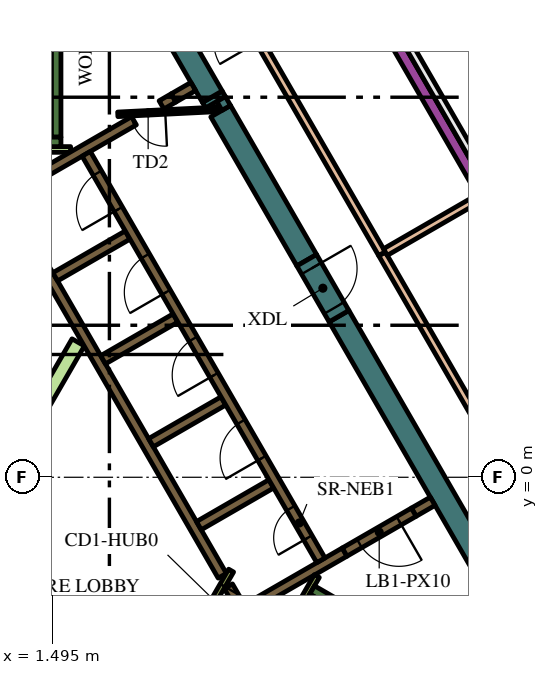
"""IFC4 building model, lengths in metres.
Left out: names, types, materials, properties, quantities, classifications, styles, units other than length and angle.
Written with IfcOpenShell. Run it as: python <this file> out.ifc"""

import sys

from ifc_helpers import new_model, si_unit, direction, frame, frame_2d, origin, place, context, subcontext, project, spatial, polyline, rectangle, outline, extrude, element, fill, save


model = new_model("IFC4")
c1 = context("Model", 3, precision=1e-05, world=origin(), true_north=direction((0.0, 1.0)))
c2 = subcontext(c1, "Body", "Model", "MODEL_VIEW")
j1 = project(units=[si_unit("LENGTHUNIT", "METRE"), si_unit("PLANEANGLEUNIT", "RADIAN")], contexts=[c1])
p1 = place(None, origin())
s1 = spatial("IfcSite", under=j1, at=p1, CompositionType="ELEMENT")
p2 = place(p1, origin())
s2 = spatial("IfcBuilding", under=s1, at=p2, CompositionType="ELEMENT")
p3 = place(p2, frame((0.0, 0.0, 336.0)))
s3 = spatial("IfcBuildingStorey", under=s2, at=p3, CompositionType="ELEMENT", Elevation=336.0)
p4 = place(p3, frame((9.042, 4.239, 0.0), z_axis=(0.0, 0.0, 1.0), x_axis=(0.500005785455, -0.866022063525, 0.0)))
e1 = element("IfcWall", 1, at=p4, inside=s3, PredefinedType="SOLIDWALL", context=c2, shape_type="SweptSolid", body=[
    extrude(rectangle(XDim=12.406, YDim=0.6, at=frame_2d((6.203, 0.0))), origin(), (0.0, 0.0, 1.0), 4.2),
])
p5 = place(p3, frame((5.709, 10.012, 0.0), z_axis=(0.0, 0.0, 1.0), x_axis=(0.500399834964, -0.865794435861, 0.0)))
e2 = element("IfcWall", 2, at=p5, inside=s3, PredefinedType="SOLIDWALL", context=c2, shape_type="SweptSolid", body=[
    extrude(rectangle(XDim=0.166, YDim=0.6, at=frame_2d((0.083, 0.0))), origin(), (0.0, 0.0, 1.0), 4.2),
])
p6 = place(p3, frame((5.928, 9.633, 0.0), z_axis=(0.0, 0.0, 1.0), x_axis=(0.499983823482, -0.8660347431, 0.0)))
e3 = element("IfcWall", 3, at=p6, inside=s3, PredefinedType="SOLIDWALL", context=c2, shape_type="SweptSolid", body=[
    extrude(rectangle(XDim=4.528, YDim=0.6, at=frame_2d((2.264, 0.0))), origin(), (0.0, 0.0, 1.0), 4.2),
])
p7 = place(p3, origin())
e4 = element("IfcWall", 4, at=p7, inside=s3, PredefinedType="SOLIDWALL", context=c2, shape_type="SweptSolid", body=[
    extrude(outline(polyline([(6.053, 10.016), (6.187, 9.784), (5.961, 9.654), (5.827, 9.886), (6.053, 10.016)])), origin(), (0.0, 0.0, 1.0), 4.2),
])
p8 = place(p3, frame((1.989, 16.456, 0.0), z_axis=(0.0, 0.0, 1.0), x_axis=(0.499990476767, -0.866030901956, 0.0)))
e5 = element("IfcWall", 5, at=p8, inside=s3, PredefinedType="SOLIDWALL", context=c2, shape_type="SweptSolid", body=[
    extrude(rectangle(XDim=7.438, YDim=0.6, at=frame_2d((3.719, 0.0))), origin(), (0.0, 0.0, 1.0), 4.2),
])
p9 = place(p3, frame((8.334, -2.964, 0.0), z_axis=(0.0, 0.0, 1.0), x_axis=(0.866016039709, -0.500016218704, 0.0)))
e6 = element("IfcWall", 6, at=p9, inside=s3, PredefinedType="SOLIDWALL", context=c2, shape_type="SweptSolid", body=[
    extrude(rectangle(XDim=7.05, YDim=0.25, at=frame_2d((3.525, 0.0))), origin(), (0.0, 0.0, 1.0), 4.2),
])
p10 = place(p3, frame((8.168, -3.503, 0.0), z_axis=(0.0, 0.0, 1.0), x_axis=(0.49972245349, 0.866185586049, 0.0)))
e7 = element("IfcWall", 7, at=p10, inside=s3, PredefinedType="SOLIDWALL", context=c2, shape_type="SweptSolid", body=[
    extrude(rectangle(XDim=0.425, YDim=0.25, at=frame_2d((0.212, 0.0))), origin(), (0.0, 0.0, 1.0), 4.2),
])
p11 = place(p3, frame((1.6, 8.95, 0.0), z_axis=(0.0, 0.0, 1.0), x_axis=(0.0, 1.0, 0.0)))
e8 = element("IfcWall", 8, at=p11, inside=s3, PredefinedType="SOLIDWALL", context=c2, shape_type="SweptSolid", body=[
    extrude(rectangle(XDim=6.8, YDim=0.25, at=frame_2d((3.4, 0.0))), origin(), (0.0, 0.0, 1.0), 4.2),
])
p12 = place(p3, frame((1.05, 8.825, 0.0), z_axis=(0.0, 0.0, 1.0), x_axis=(1.0, 0.0, 0.0)))
e9 = element("IfcWall", 9, at=p12, inside=s3, PredefinedType="SOLIDWALL", context=c2, shape_type="SweptSolid", body=[
    extrude(rectangle(XDim=0.675, YDim=0.25, at=frame_2d((0.337, 0.0))), origin(), (0.0, 0.0, 1.0), 4.2),
])
p13 = place(p3, frame((9.19, -1.969, 0.0), z_axis=(0.0, 0.0, 1.0), x_axis=(-0.866057109641, -0.499945079824, 0.0)))
e10 = element("IfcWall", 10, at=p13, inside=s3, PredefinedType="SOLIDWALL", context=c2, shape_type="SweptSolid", body=[
    extrude(rectangle(XDim=3.291, YDim=0.25, at=frame_2d((1.646, 0.0))), origin(), (0.0, 0.0, 1.0), 4.2),
])
p14 = place(p3, frame((6.13, -2.867, 0.0), z_axis=(0.0, 0.0, 1.0), x_axis=(0.500160776593, -0.865932559475, 0.0)))
e11 = element("IfcWall", 11, at=p14, inside=s3, PredefinedType="SOLIDWALL", context=c2, shape_type="SweptSolid", body=[
    extrude(rectangle(XDim=0.627, YDim=0.25, at=frame_2d((0.313, 0.0))), origin(), (0.0, 0.0, 1.0), 4.2),
])
p15 = place(p3, frame((11.507, -0.631, 0.0), z_axis=(0.0, 0.0, 1.0), x_axis=(-0.866093731455, -0.499881634324, 0.0)))
e12 = element("IfcWall", 12, at=p15, inside=s3, PredefinedType="SOLIDWALL", context=c2, shape_type="SweptSolid", body=[
    extrude(rectangle(XDim=0.575, YDim=0.25, at=frame_2d((0.288, 0.0))), origin(), (0.0, 0.0, 1.0), 4.2),
])
p16 = place(p3, frame((3.647, 9.38, 0.0), z_axis=(0.0, 0.0, 1.0), x_axis=(-0.866027868628, -0.499995730742, 0.0)))
e13 = element("IfcWall", 13, at=p16, inside=s3, PredefinedType="SOLIDWALL", context=c2, shape_type="SweptSolid", body=[
    extrude(rectangle(XDim=4.099, YDim=0.25, at=frame_2d((2.049, 0.0))), origin(), (0.0, 0.0, 1.0), 4.2),
])
p17 = place(p3, frame((5.97, -2.591, 0.0), z_axis=(0.0, 0.0, 1.0), x_axis=(-0.499994469932, 0.866028596547, 0.0)))
e14 = element("IfcWall", 14, at=p17, inside=s3, PredefinedType="SOLIDWALL", context=c2, shape_type="SweptSolid", body=[
    extrude(rectangle(XDim=10.488, YDim=0.25, at=frame_2d((5.244, 0.0))), origin(), (0.0, 0.0, 1.0), 4.2),
])
p18 = place(p3, frame((1.574, 5.274, 0.0), z_axis=(0.0, 0.0, 1.0), x_axis=(0.866028486751, 0.499994660107, 0.0)))
e15 = element("IfcWall", 15, at=p18, inside=s3, PredefinedType="SOLIDWALL", context=c2, shape_type="SweptSolid", body=[
    extrude(rectangle(XDim=2.2, YDim=0.25, at=frame_2d((1.1, 0.0))), origin(), (0.0, 0.0, 1.0), 4.2),
])
for number, where, z_axis, x_axis in (
    (16, (2.834, 3.091, 0.0), (0.0, 0.0, 1.0), (0.866, 0.5, 0.0)),
    (17, (4.094, 0.909, 0.0), (0.0, 0.0, 1.0), (0.866, 0.5, 0.0)),
    (18, (5.354, -1.274, 0.0), (0.0, 0.0, 1.0), (0.866, 0.5, 0.0)),
):
    element("IfcWall", number, at=place(p3, frame(where, z_axis=z_axis, x_axis=x_axis)), inside=s3, PredefinedType="SOLIDWALL", context=c2, shape_type="SweptSolid", body=[
        extrude(rectangle(XDim=2.2, YDim=0.25, at=frame_2d((1.1, 0.0))), origin(), (0.0, 0.0, 1.0), 4.2),
    ])
p19 = place(p3, frame((4.688, 9.981, 0.0), z_axis=(0.0, 0.0, 1.0), x_axis=(-0.865974312977, -0.500088481434, 0.0)))
e19 = element("IfcWall", 19, at=p19, inside=s3, PredefinedType="SOLIDWALL", context=c2, shape_type="SweptSolid", body=[
    extrude(rectangle(XDim=0.366, YDim=0.25, at=frame_2d((0.183, 0.0))), origin(), (0.0, 0.0, 1.0), 4.2),
])
p20 = place(p3, frame((4.689, 9.982, 0.0), z_axis=(0.0, 0.0, 1.0), x_axis=(0.865947592822, 0.500134748329, 0.0)))
e20 = element("IfcWall", 20, at=p20, inside=s3, PredefinedType="SOLIDWALL", context=c2, shape_type="SweptSolid", body=[
    extrude(rectangle(XDim=0.598, YDim=0.25, at=frame_2d((0.299, 0.0))), origin(), (0.0, 0.0, 1.0), 4.2),
])
p21 = place(p3, frame((1.05, 8.625, 0.0), z_axis=(0.0, 0.0, 1.0), x_axis=(1.0, 0.0, 0.0)))
e21 = element("IfcWall", 21, at=p21, inside=s3, PredefinedType="PARTITIONING", context=c2, shape_type="SweptSolid", body=[
    extrude(rectangle(XDim=0.929, YDim=0.15, at=frame_2d((0.464, 0.0))), origin(), (0.0, 0.0, 1.0), 3.45),
])
p22 = place(p3, frame((8.459, -2.599, 0.0), z_axis=(0.0, 0.0, 1.0), x_axis=(-0.500041054325, -0.866001699761, 0.0)))
e22 = element("IfcWall", 22, at=p22, inside=s3, PredefinedType="PARTITIONING", context=c2, shape_type="SweptSolid", body=[
    extrude(rectangle(XDim=0.929, YDim=0.15, at=frame_2d((0.464, 0.0))), origin(), (0.0, 0.0, 1.0), 4.2),
])
e23 = element("IfcWall", 23, at=p7, inside=s3, PredefinedType="PARTITIONING", context=c2, shape_type="SweptSolid", body=[
    extrude(outline(polyline([(2.017, 3.643), (2.342, 3.456), (-1.822, -3.756), (-2.147, -3.568), (2.017, 3.643)])), origin(), (0.0, 0.0, 1.0), 3.45),
])
p23 = place(p3, frame((8.565, -2.185, 0.0), z_axis=(0.0, 0.0, 1.0), x_axis=(-0.499997954832, 0.866026584559, 0.0)))
e24 = element("IfcWall", 24, at=p23, inside=s3, PredefinedType="SOLIDWALL", context=c2, shape_type="SweptSolid", body=[
    extrude(rectangle(XDim=12.35, YDim=0.25, at=frame_2d((6.175, 0.0))), origin(), (0.0, 0.0, 1.0), 4.2),
])
p24 = place(p23, frame((0.685, 0.0, 0.0)))
e25 = element("IfcOpeningElement", 25, at=p24, cuts=e24, PredefinedType="OPENING", context=c2, shape_type="SweptSolid", body=[
    extrude(rectangle(XDim=0.9, YDim=2.1, at=frame_2d((0.45, 1.05))), frame((0.0, 0.135, 0.0), z_axis=(0.0, -1.0, 0.0), x_axis=(1.0, 0.0, 0.0)), (0.0, 0.0, 1.0), 0.27),
])
p25 = place(p23, frame((3.105, 0.0, 0.0)))
e26 = element("IfcOpeningElement", 26, at=p25, cuts=e24, PredefinedType="OPENING", context=c2, shape_type="SweptSolid", body=[
    extrude(rectangle(XDim=1.1, YDim=2.1, at=frame_2d((0.55, 1.05))), frame((0.0, 0.135, 0.0), z_axis=(0.0, -1.0, 0.0), x_axis=(1.0, 0.0, 0.0)), (0.0, 0.0, 1.0), 0.27),
])
p26 = place(p23, frame((5.625, 0.0, 0.0)))
e27 = element("IfcOpeningElement", 27, at=p26, cuts=e24, PredefinedType="OPENING", context=c2, shape_type="SweptSolid", body=[
    extrude(rectangle(XDim=1.1, YDim=2.1, at=frame_2d((0.55, 1.05))), frame((0.0, 0.135, 0.0), z_axis=(0.0, -1.0, 0.0), x_axis=(1.0, 0.0, 0.0)), (0.0, 0.0, 1.0), 0.27),
])
p27 = place(p23, frame((8.145, 0.0, 0.0)))
e28 = element("IfcOpeningElement", 28, at=p27, cuts=e24, PredefinedType="OPENING", context=c2, shape_type="SweptSolid", body=[
    extrude(rectangle(XDim=1.1, YDim=2.1, at=frame_2d((0.55, 1.05))), frame((0.0, 0.135, 0.0), z_axis=(0.0, -1.0, 0.0), x_axis=(1.0, 0.0, 0.0)), (0.0, 0.0, 1.0), 0.27),
])
p28 = place(p23, frame((10.665, 0.0, 0.0)))
e29 = element("IfcOpeningElement", 29, at=p28, cuts=e24, PredefinedType="OPENING", context=c2, shape_type="SweptSolid", body=[
    extrude(rectangle(XDim=1.1, YDim=2.1, at=frame_2d((0.55, 1.05))), frame((0.0, 0.135, 0.0), z_axis=(0.0, -1.0, 0.0), x_axis=(1.0, 0.0, 0.0)), (0.0, 0.0, 1.0), 0.27),
])
p29 = place(p3, frame((5.917, 9.684, 0.0), z_axis=(0.0, 0.0, 1.0), x_axis=(-0.998758194515, -0.049820366212, 0.0)))
e30 = element("IfcWall", 30, at=p29, inside=s3, PredefinedType="PARTITIONING", context=c2, shape_type="SweptSolid", body=[
    extrude(rectangle(XDim=2.7, YDim=0.12, at=frame_2d((1.35, 0.0))), origin(), (0.0, 0.0, 1.0), 3.45),
])
p30 = place(p29, frame((1.45, 0.0, 0.0)))
e31 = element("IfcOpeningElement", 31, at=p30, cuts=e30, PredefinedType="OPENING", context=c2, shape_type="SweptSolid", body=[
    extrude(rectangle(XDim=0.9, YDim=2.1, at=frame_2d((0.45, 1.05))), frame((0.0, 0.07, 0.0), z_axis=(0.0, -1.0, 0.0), x_axis=(1.0, 0.0, 0.0)), (0.0, 0.0, 1.0), 0.14),
])
p31 = place(p3, frame((6.203, -2.456, 0.0), z_axis=(0.0, 0.0, 1.0), x_axis=(-0.500043961785, -0.866000020948, 0.0)))
e32 = element("IfcWall", 32, at=p31, inside=s3, PredefinedType="PARTITIONING", context=c2, shape_type="SweptSolid", body=[
    extrude(rectangle(XDim=1.95, YDim=0.15, at=frame_2d((0.975, 0.0))), origin(), (0.0, 0.0, 1.0), 4.2),
])
p32 = place(p31, frame((0.45, 0.0, 0.0)))
e33 = element("IfcOpeningElement", 33, at=p32, cuts=e32, PredefinedType="OPENING", context=c2, shape_type="SweptSolid", body=[
    extrude(rectangle(XDim=0.9, YDim=2.1, at=frame_2d((0.45, 1.05))), frame((0.0, 0.085, 0.0), z_axis=(0.0, -1.0, 0.0), x_axis=(1.0, 0.0, 0.0)), (0.0, 0.0, 1.0), 0.17),
])
p33 = place(p3, frame((11.009, -0.919, 0.0), z_axis=(0.0, 0.0, 1.0), x_axis=(-0.866059744384, -0.49994051562, 0.0)))
e34 = element("IfcWall", 34, at=p33, inside=s3, PredefinedType="SOLIDWALL", context=c2, shape_type="SweptSolid", body=[
    extrude(rectangle(XDim=2.1, YDim=0.25, at=frame_2d((1.05, 0.0))), origin(), (0.0, 0.0, 1.0), 4.2),
])
p34 = place(p33, frame((0.45, 0.0, 0.0)))
e35 = element("IfcOpeningElement", 35, at=p34, cuts=e34, PredefinedType="OPENING", context=c2, shape_type="SweptSolid", body=[
    extrude(rectangle(XDim=1.2, YDim=2.1, at=frame_2d((0.6, 1.05))), frame((0.0, 0.135, 0.0), z_axis=(0.0, -1.0, 0.0), x_axis=(1.0, 0.0, 0.0)), (0.0, 0.0, 1.0), 0.27),
])
p35 = place(p3, frame((8.192, 5.711, 0.0), z_axis=(0.0, 0.0, 1.0), x_axis=(0.500062241894, -0.865989465428, 0.0)))
e36 = element("IfcWall", 36, at=p35, inside=s3, PredefinedType="SOLIDWALL", context=c2, shape_type="SweptSolid", body=[
    extrude(rectangle(XDim=1.7, YDim=0.6, at=frame_2d((0.85, 0.0))), origin(), (0.0, 0.0, 1.0), 4.2),
])
p36 = place(p35, frame((0.25, 0.0, 0.0)))
e37 = element("IfcOpeningElement", 37, at=p36, cuts=e36, PredefinedType="OPENING", context=c2, shape_type="SweptSolid", body=[
    extrude(rectangle(XDim=1.2, YDim=2.1, at=frame_2d((0.6, 1.05))), frame((0.0, 0.31, 0.0), z_axis=(0.0, -1.0, 0.0), x_axis=(1.0, 0.0, 0.0)), (0.0, 0.0, 1.0), 0.62),
])
p37 = place(p3, frame((17.234, -6.35, 0.0), z_axis=(0.0, 0.0, 1.0), x_axis=(-0.499989432091, 0.866031505083, 0.0)))
e38 = element("IfcWall", 38, at=p37, inside=s3, PredefinedType="PARTITIONING", context=c2, shape_type="SweptSolid", body=[
    extrude(rectangle(XDim=14.116, YDim=0.2, at=frame_2d((7.058, 0.0))), origin(), (0.0, 0.0, 1.0), 3.45),
])
p38 = place(p37, frame((6.458, 0.0, 0.0)))
e39 = element("IfcOpeningElement", 39, at=p38, cuts=e38, PredefinedType="OPENING", context=c2, shape_type="SweptSolid", body=[
    extrude(rectangle(XDim=1.2, YDim=2.1, at=frame_2d((0.6, 1.05))), frame((0.0, 0.11, 0.0), z_axis=(0.0, -1.0, 0.0), x_axis=(1.0, 0.0, 0.0)), (0.0, 0.0, 1.0), 0.22),
])
p39 = place(p3, frame((10.171, 5.884, 0.0), z_axis=(0.0, 0.0, 1.0), x_axis=(-0.499999609035, 0.866025629508, 0.0)))
e40 = element("IfcWall", 40, at=p39, inside=s3, PredefinedType="PARTITIONING", context=c2, shape_type="SweptSolid", body=[
    extrude(rectangle(XDim=14.106, YDim=0.2, at=frame_2d((7.053, 0.0))), origin(), (0.0, 0.0, 1.0), 3.45),
])
p40 = place(p39, frame((6.453, 0.0, 0.0)))
e41 = element("IfcOpeningElement", 41, at=p40, cuts=e40, PredefinedType="OPENING", context=c2, shape_type="SweptSolid", body=[
    extrude(rectangle(XDim=1.2, YDim=2.1, at=frame_2d((0.6, 1.05))), frame((0.0, 0.11, 0.0), z_axis=(0.0, -1.0, 0.0), x_axis=(1.0, 0.0, 0.0)), (0.0, 0.0, 1.0), 0.22),
])
p41 = place(p3, frame((10.262, 5.925, 0.0), z_axis=(0.0, 0.0, 1.0), x_axis=(0.866035871367, 0.499981869177, 0.0)))
e42 = element("IfcWall", 42, at=p41, inside=s3, PredefinedType="PARTITIONING", context=c2, shape_type="SweptSolid", body=[
    extrude(rectangle(XDim=3.15, YDim=0.2, at=frame_2d((1.575, 0.0))), origin(), (0.0, 0.0, 1.0), 3.45),
])
p42 = place(p3, frame((18.181, -1.79, 0.0), z_axis=(0.0, 0.0, 1.0), x_axis=(-0.500002158106, 0.866024157798, 0.0)))
e43 = element("IfcWall", 43, at=p42, inside=s3, PredefinedType="SOLIDWALL", context=c2, shape_type="SweptSolid", body=[
    extrude(rectangle(XDim=21.282, YDim=0.3, at=frame_2d((10.641, 0.0))), origin(), (0.0, 0.0, 1.0), 3.45),
])
p43 = place(p24, origin())
e44 = element("IfcDoor", 44, at=p43, inside=s3, OperationType="SINGLE_SWING_LEFT", PredefinedType="DOOR", context=c2, shape_type="SweptSolid", body=[
    extrude(rectangle(XDim=0.9, YDim=2.1, at=frame_2d((0.45, 1.05))), frame((0.0, 0.025, 0.0), z_axis=(0.0, -1.0, 0.0), x_axis=(1.0, 0.0, 0.0)), (0.0, 0.0, 1.0), 0.05),
])
fill(e25, e44)
p44 = place(p25, origin())
e45 = element("IfcDoor", 45, at=p44, inside=s3, OperationType="DOUBLE_DOOR_SLIDING", PredefinedType="DOOR", context=c2, shape_type="SweptSolid", body=[
    extrude(rectangle(XDim=1.1, YDim=2.1, at=frame_2d((0.55, 1.05))), frame((0.0, 0.025, 0.0), z_axis=(0.0, -1.0, 0.0), x_axis=(1.0, 0.0, 0.0)), (0.0, 0.0, 1.0), 0.05),
])
fill(e26, e45)
p45 = place(p26, origin())
e46 = element("IfcDoor", 46, at=p45, inside=s3, OperationType="DOUBLE_DOOR_SLIDING", PredefinedType="DOOR", context=c2, shape_type="SweptSolid", body=[
    extrude(rectangle(XDim=1.1, YDim=2.1, at=frame_2d((0.55, 1.05))), frame((0.0, 0.025, 0.0), z_axis=(0.0, -1.0, 0.0), x_axis=(1.0, 0.0, 0.0)), (0.0, 0.0, 1.0), 0.05),
])
fill(e27, e46)
p46 = place(p27, origin())
e47 = element("IfcDoor", 47, at=p46, inside=s3, OperationType="DOUBLE_DOOR_SLIDING", PredefinedType="DOOR", context=c2, shape_type="SweptSolid", body=[
    extrude(rectangle(XDim=1.1, YDim=2.1, at=frame_2d((0.55, 1.05))), frame((0.0, 0.025, 0.0), z_axis=(0.0, -1.0, 0.0), x_axis=(1.0, 0.0, 0.0)), (0.0, 0.0, 1.0), 0.05),
])
fill(e28, e47)
p47 = place(p28, origin())
e48 = element("IfcDoor", 48, at=p47, inside=s3, OperationType="DOUBLE_DOOR_SLIDING", PredefinedType="DOOR", context=c2, shape_type="SweptSolid", body=[
    extrude(rectangle(XDim=1.1, YDim=2.1, at=frame_2d((0.55, 1.05))), frame((0.0, 0.025, 0.0), z_axis=(0.0, -1.0, 0.0), x_axis=(1.0, 0.0, 0.0)), (0.0, 0.0, 1.0), 0.05),
])
fill(e29, e48)
p48 = place(p30, origin())
e49 = element("IfcDoor", 49, at=p48, inside=s3, OperationType="SINGLE_SWING_LEFT", PredefinedType="DOOR", context=c2, shape_type="SweptSolid", body=[
    extrude(rectangle(XDim=0.9, YDim=2.1, at=frame_2d((0.45, 1.05))), frame((0.0, 0.025, 0.0), z_axis=(0.0, -1.0, 0.0), x_axis=(1.0, 0.0, 0.0)), (0.0, 0.0, 1.0), 0.05),
])
fill(e31, e49)
p49 = place(p32, origin())
e50 = element("IfcDoor", 50, at=p49, inside=s3, OperationType="SINGLE_SWING_LEFT", PredefinedType="DOOR", context=c2, shape_type="SweptSolid", body=[
    extrude(rectangle(XDim=0.9, YDim=2.1, at=frame_2d((0.45, 1.05))), frame((0.0, 0.025, 0.0), z_axis=(0.0, -1.0, 0.0), x_axis=(1.0, 0.0, 0.0)), (0.0, 0.0, 1.0), 0.05),
])
fill(e33, e50)
p50 = place(p34, origin())
e51 = element("IfcDoor", 51, at=p50, inside=s3, OperationType="SINGLE_SWING_LEFT", PredefinedType="DOOR", context=c2, shape_type="SweptSolid", body=[
    extrude(rectangle(XDim=1.2, YDim=2.1, at=frame_2d((0.6, 1.05))), frame((0.0, 0.025, 0.0), z_axis=(0.0, -1.0, 0.0), x_axis=(1.0, 0.0, 0.0)), (0.0, 0.0, 1.0), 0.05),
])
fill(e35, e51)
p51 = place(p36, origin())
e52 = element("IfcDoor", 52, at=p51, inside=s3, OperationType="SINGLE_SWING_LEFT", PredefinedType="DOOR", context=c2, shape_type="SweptSolid", body=[
    extrude(rectangle(XDim=1.2, YDim=2.1, at=frame_2d((0.6, 1.05))), frame((0.0, 0.025, 0.0), z_axis=(0.0, -1.0, 0.0), x_axis=(1.0, 0.0, 0.0)), (0.0, 0.0, 1.0), 0.05),
])
fill(e37, e52)
save(model, sys.argv[1])
